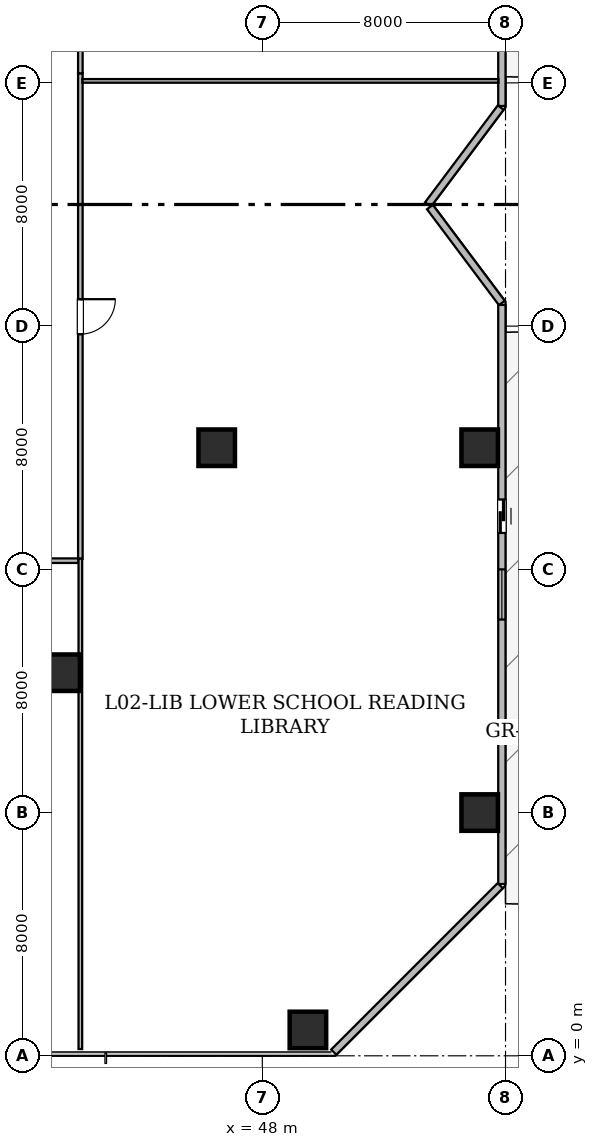
"""IFC4 building model, lengths in metres.
Left out: names, types, materials, properties, quantities, classifications, styles, units other than length and angle.
Written with IfcOpenShell. Run it as: python <this file> out.ifc"""

import sys

from ifc_helpers import new_model, si_unit, direction, frame, frame_2d, origin, origin_2d, place, context, subcontext, project, spatial, rectangle, hollow_rectangle, extrude, element, fill, save


model = new_model("IFC4")
c1 = context("Model", 3, precision=1e-05, world=origin(), true_north=direction((0.0, 1.0)))
c2 = subcontext(c1, "Body", "Model", "MODEL_VIEW")
j1 = project(units=[si_unit("LENGTHUNIT", "METRE"), si_unit("PLANEANGLEUNIT", "RADIAN")], contexts=[c1])
p1 = place(None, origin())
s1 = spatial("IfcSite", under=j1, at=p1, CompositionType="ELEMENT")
p2 = place(p1, origin())
s2 = spatial("IfcBuilding", under=s1, at=p2, CompositionType="ELEMENT")
p3 = place(p2, frame((0.0, 0.0, 12.0)))
s3 = spatial("IfcBuildingStorey", under=s2, at=p3, CompositionType="ELEMENT", Elevation=12.0)
for number, where, z_axis, x_axis in (
    (1, (49.5, 0.85, 0.0), (0.0, 0.0, 1.0), (1.0, 0.0, 0.0)),
    (2, (55.15, 8.0, 0.0), (0.0, 0.0, 1.0), (1.0, 0.0, 0.0)),
    (3, (55.15, 20.0, 0.0), (0.0, 0.0, 1.0), (1.0, 0.0, 0.0)),
    (4, (41.4, 12.6, 0.0), (0.0, 0.0, 1.0), (1.0, 0.0, 0.0)),
    (5, (46.5, 20.0, 0.0), (0.0, 0.0, 1.0), (1.0, 0.0, 0.0)),
):
    element("IfcColumn", number, at=place(p3, frame(where, z_axis=z_axis, x_axis=x_axis)), inside=s3, PredefinedType="COLUMN", context=c2, shape_type="SweptSolid", body=[
        extrude(hollow_rectangle(XDim=1.2, YDim=1.2, WallThickness=0.06, at=origin_2d()), origin(), (0.0, 0.0, 1.0), 4.2),
    ])
p4 = place(p3, frame((55.88, 50.272, 0.0), z_axis=(0.0, 0.0, 1.0), x_axis=(0.0, -1.0, 0.0)))
e6 = element("IfcWall", 6, at=p4, inside=s3, PredefinedType="STANDARD", context=c2, shape_type="SweptSolid", body=[
    extrude(rectangle(XDim=19.032, YDim=0.24, at=frame_2d((9.516, 0.0))), origin(), (0.0, 0.0, 1.0), 3.92),
])
p5 = place(p4, frame((4.941, 0.0, 0.0)))
e7 = element("IfcOpeningElement", 7, at=p5, cuts=e6, PredefinedType="OPENING", context=c2, shape_type="SweptSolid", body=[
    extrude(rectangle(XDim=1.1, YDim=2.2, at=frame_2d((0.55, 1.1))), frame((0.0, 0.13, 0.0), z_axis=(0.0, -1.0, 0.0), x_axis=(1.0, 0.0, 0.0)), (0.0, 0.0, 1.0), 0.26),
])
p6 = place(p4, frame((8.591, 0.0, 0.85)))
e8 = element("IfcOpeningElement", 8, at=p6, cuts=e6, PredefinedType="OPENING", context=c2, shape_type="SweptSolid", body=[
    extrude(rectangle(XDim=1.65, YDim=1.55, at=frame_2d((0.825, 0.775))), frame((0.0, 0.13, 0.0), z_axis=(0.0, -1.0, 0.0), x_axis=(1.0, 0.0, 0.0)), (0.0, 0.0, 1.0), 0.26),
])
p7 = place(p3, frame((55.842, 31.189, 0.0), z_axis=(0.0, 0.0, 1.0), x_axis=(-0.600058791648, -0.799955902889, 0.0)))
e9 = element("IfcWall", 9, at=p7, inside=s3, PredefinedType="STANDARD", context=c2, shape_type="SweptSolid", body=[
    extrude(rectangle(XDim=3.986, YDim=0.24, at=frame_2d((1.993, 0.0))), origin(), (0.0, 0.0, 1.0), 3.92),
])
p8 = place(p3, frame((53.513, 27.916, 0.0), z_axis=(0.0, 0.0, 1.0), x_axis=(0.599990098106, -0.800007426325, 0.0)))
e10 = element("IfcWall", 10, at=p8, inside=s3, PredefinedType="STANDARD", context=c2, shape_type="SweptSolid", body=[
    extrude(rectangle(XDim=3.945, YDim=0.24, at=frame_2d((1.973, 0.0))), origin(), (0.0, 0.0, 1.0), 3.92),
])
p9 = place(p3, frame((55.88, 24.698, 0.0), z_axis=(0.0, 0.0, 1.0), x_axis=(0.0, -1.0, 0.0)))
e11 = element("IfcWall", 11, at=p9, inside=s3, PredefinedType="STANDARD", context=c2, shape_type="SweptSolid", body=[
    extrude(rectangle(XDim=19.048, YDim=0.24, at=frame_2d((9.524, 0.0))), origin(), (0.0, 0.0, 1.0), 3.92),
])
p10 = place(p9, frame((6.401, 0.0, 0.0)))
e12 = element("IfcOpeningElement", 12, at=p10, cuts=e11, PredefinedType="OPENING", context=c2, shape_type="SweptSolid", body=[
    extrude(rectangle(XDim=1.1, YDim=2.2, at=frame_2d((0.55, 1.1))), frame((0.0, 0.13, 0.0), z_axis=(0.0, -1.0, 0.0), x_axis=(1.0, 0.0, 0.0)), (0.0, 0.0, 1.0), 0.26),
])
p11 = place(p9, frame((8.699, 0.0, 0.85)))
e13 = element("IfcOpeningElement", 13, at=p11, cuts=e11, PredefinedType="OPENING", context=c2, shape_type="SweptSolid", body=[
    extrude(rectangle(XDim=1.65, YDim=1.55, at=frame_2d((0.825, 0.775))), frame((0.0, 0.13, 0.0), z_axis=(0.0, -1.0, 0.0), x_axis=(1.0, 0.0, 0.0)), (0.0, 0.0, 1.0), 0.26),
])
p12 = place(p3, frame((55.826, 5.596, 0.0), z_axis=(0.0, 0.0, 1.0), x_axis=(-0.707106781187, -0.707106781187, 0.0)))
e14 = element("IfcWall", 14, at=p12, inside=s3, PredefinedType="STANDARD", context=c2, shape_type="SweptSolid", body=[
    extrude(rectangle(XDim=7.744, YDim=0.24, at=frame_2d((3.872, 0.0))), origin(), (0.0, 0.0, 1.0), 3.92),
])
p13 = place(p3, frame((42.015, 32.314, 0.0), z_axis=(0.0, 0.0, 1.0), x_axis=(0.0, -1.0, 0.0)))
e15 = element("IfcWall", 15, at=p13, inside=s3, PredefinedType="STANDARD", context=c2, shape_type="SweptSolid", body=[
    extrude(rectangle(XDim=15.964, YDim=0.15, at=frame_2d((7.982, 0.0))), origin(), (0.0, 0.0, 1.0), 3.055),
])
p14 = place(p13, frame((7.428, 0.0, 0.0)))
e16 = element("IfcOpeningElement", 16, at=p14, cuts=e15, PredefinedType="OPENING", context=c2, shape_type="SweptSolid", body=[
    extrude(rectangle(XDim=1.15, YDim=2.2, at=frame_2d((0.575, 1.1))), frame((0.0, 0.085, 0.0), z_axis=(0.0, -1.0, 0.0), x_axis=(1.0, 0.0, 0.0)), (0.0, 0.0, 1.0), 0.17),
])
p15 = place(p3, frame((42.015, 39.65, 0.0), z_axis=(0.0, 0.0, 1.0), x_axis=(0.0, -1.0, 0.0)))
e17 = element("IfcWall", 17, at=p15, inside=s3, PredefinedType="STANDARD", context=c2, shape_type="SweptSolid", body=[
    extrude(rectangle(XDim=7.336, YDim=0.15, at=frame_2d((3.668, 0.0))), origin(), (0.0, 0.0, 1.0), 3.055),
])
p16 = place(p15, frame((3.093, 0.0, 0.0)))
e18 = element("IfcOpeningElement", 18, at=p16, cuts=e17, PredefinedType="OPENING", context=c2, shape_type="SweptSolid", body=[
    extrude(rectangle(XDim=1.15, YDim=2.2, at=frame_2d((0.575, 1.1))), frame((0.0, 0.085, 0.0), z_axis=(0.0, -1.0, 0.0), x_axis=(1.0, 0.0, 0.0)), (0.0, 0.0, 1.0), 0.17),
])
p17 = place(p3, frame((41.95, 16.285, 0.0), z_axis=(0.0, 0.0, 1.0), x_axis=(-1.0, 0.0, 0.0)))
e19 = element("IfcWall", 19, at=p17, inside=s3, PredefinedType="STANDARD", context=c2, shape_type="SweptSolid", body=[
    extrude(rectangle(XDim=15.7, YDim=0.15, at=frame_2d((7.85, 0.0))), origin(), (0.0, 0.0, 1.0), 3.055),
])
p18 = place(p17, frame((7.4, 0.0, 0.0)))
e20 = element("IfcOpeningElement", 20, at=p18, cuts=e19, PredefinedType="OPENING", context=c2, shape_type="SweptSolid", body=[
    extrude(rectangle(XDim=0.9, YDim=2.1, at=frame_2d((0.45, 1.05))), frame((0.0, 0.085, 0.0), z_axis=(0.0, -1.0, 0.0), x_axis=(1.0, 0.0, 0.0)), (0.0, 0.0, 1.0), 0.17),
])
p19 = place(p3, frame((42.082, 32.065, 0.0), z_axis=(0.0, 0.0, 1.0), x_axis=(1.0, 0.0, 0.0)))
e21 = element("IfcWall", 21, at=p19, inside=s3, PredefinedType="PARTITIONING", context=c2, shape_type="SweptSolid", body=[
    extrude(rectangle(XDim=13.686, YDim=0.12, at=frame_2d((6.843, 0.0))), origin(), (0.0, 0.0, 1.0), 3.055),
])
p20 = place(p3, frame((42.015, 0.222, 0.0), z_axis=(0.0, 0.0, 1.0), x_axis=(0.0, 1.0, 0.0)))
e22 = element("IfcWall", 22, at=p20, inside=s3, PredefinedType="PARTITIONING", context=c2, shape_type="SweptSolid", body=[
    extrude(rectangle(XDim=16.128, YDim=0.12, at=frame_2d((8.064, 0.0))), origin(), (0.0, 0.0, 1.0), 3.055),
])
p21 = place(p10, origin())
e23 = element("IfcDoor", 23, at=p21, inside=s3, OperationType="SLIDING_TO_LEFT", PredefinedType="DOOR", context=c2, shape_type="SweptSolid", body=[
    extrude(rectangle(XDim=1.1, YDim=2.2, at=frame_2d((0.55, 1.1))), frame((0.0, 0.025, 0.0), z_axis=(0.0, -1.0, 0.0), x_axis=(1.0, 0.0, 0.0)), (0.0, 0.0, 1.0), 0.05),
])
fill(e12, e23)
p22 = place(p11, origin())
e24 = element("IfcWindow", 24, at=p22, inside=s3, PartitioningType="SINGLE_PANEL", PredefinedType="WINDOW", context=c2, shape_type="SweptSolid", body=[
    extrude(rectangle(XDim=1.65, YDim=1.55, at=frame_2d((0.825, 0.775))), frame((0.0, 0.03, 0.0), z_axis=(0.0, -1.0, 0.0), x_axis=(1.0, 0.0, 0.0)), (0.0, 0.0, 1.0), 0.06),
])
fill(e13, e24)
p23 = place(p14, origin())
e25 = element("IfcDoor", 25, at=p23, inside=s3, OperationType="SINGLE_SWING_LEFT", PredefinedType="DOOR", context=c2, shape_type="SweptSolid", body=[
    extrude(rectangle(XDim=1.15, YDim=2.2, at=frame_2d((0.575, 1.1))), frame((0.0, 0.025, 0.0), z_axis=(0.0, -1.0, 0.0), x_axis=(1.0, 0.0, 0.0)), (0.0, 0.0, 1.0), 0.05),
])
fill(e16, e25)
save(model, sys.argv[1])
